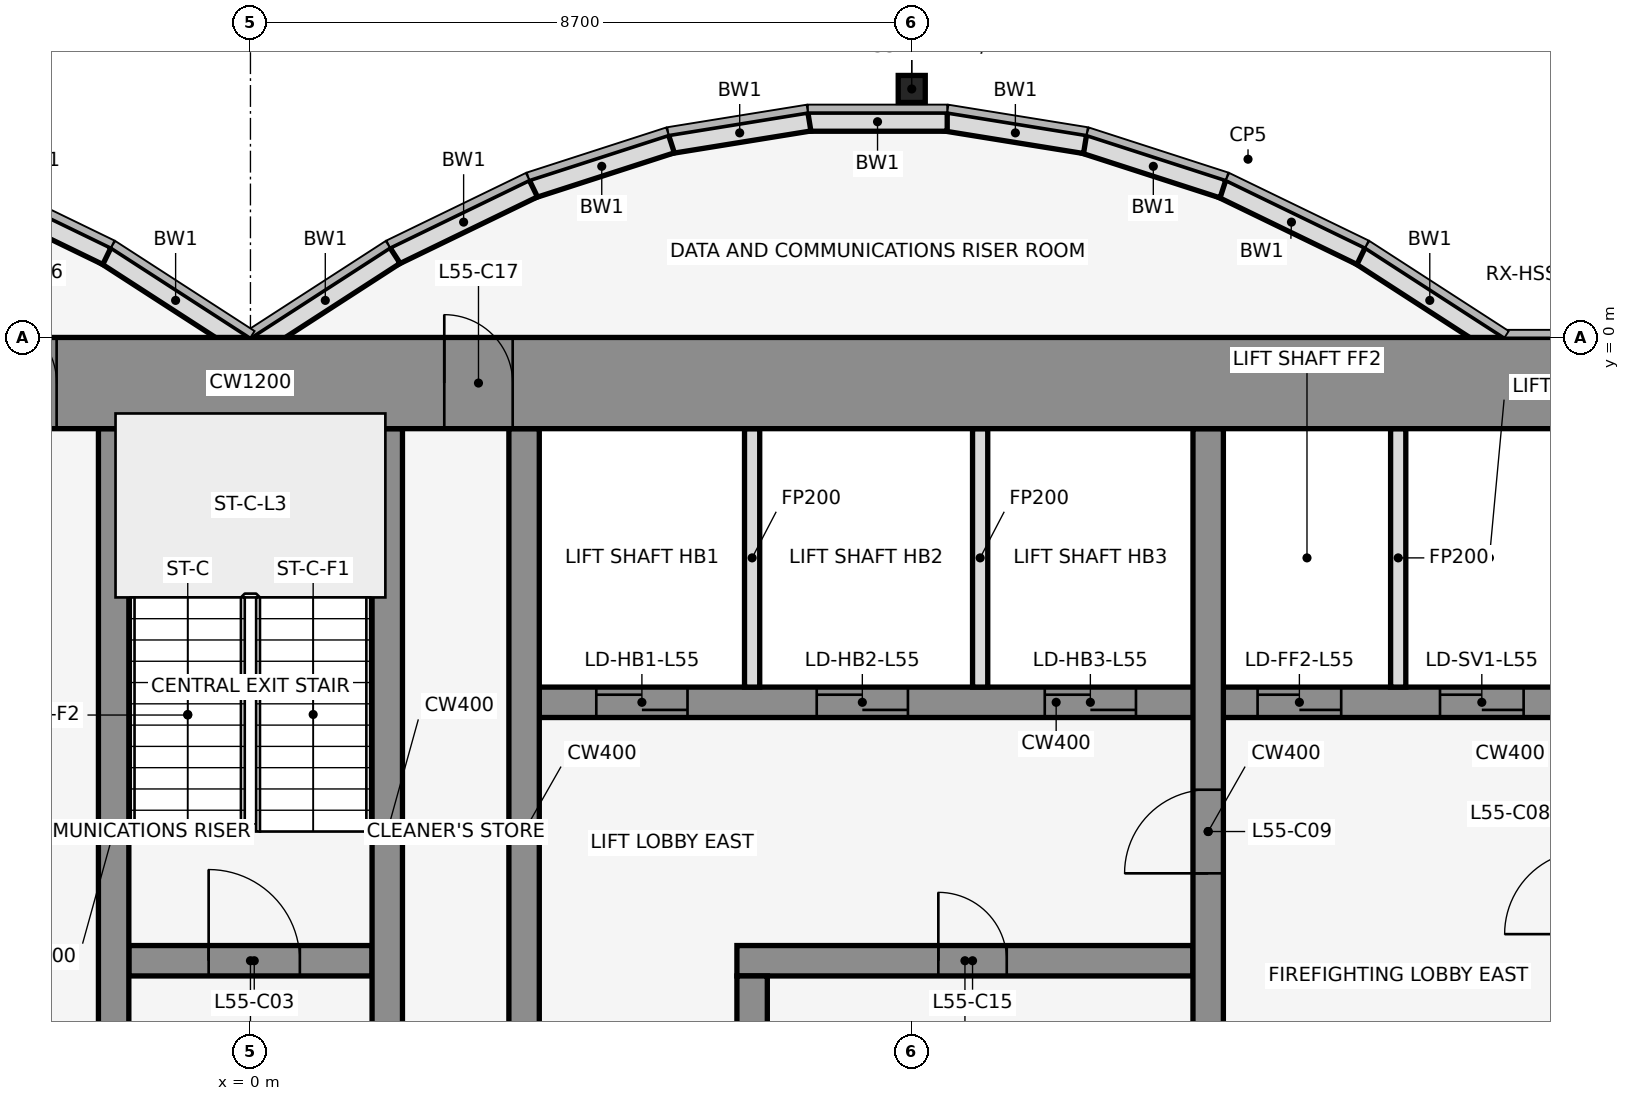
"""IFC4 building model, lengths in metres.
Left out: names, types, materials, properties, quantities, classifications, styles, units other than length and angle.
Written with IfcOpenShell. Run it as: python <this file> out.ifc"""

import sys

from ifc_helpers import new_model, si_unit, direction, frame, frame_2d, origin, origin_2d, place, context, subcontext, project, spatial, rectangle, hollow_rectangle, extrude, element, fill, save


model = new_model("IFC4")
c1 = context("Model", 3, precision=1e-05, world=origin(), true_north=direction((0.0, 1.0)))
c2 = subcontext(c1, "Body", "Model", "MODEL_VIEW")
j1 = project(units=[si_unit("LENGTHUNIT", "METRE"), si_unit("PLANEANGLEUNIT", "RADIAN")], contexts=[c1])
p1 = place(None, origin())
s1 = spatial("IfcSite", under=j1, at=p1, CompositionType="ELEMENT")
p2 = place(p1, origin())
s2 = spatial("IfcBuilding", under=s1, at=p2, CompositionType="ELEMENT")
p3 = place(p2, frame((0.0, 0.0, 245.6)))
s3 = spatial("IfcBuildingStorey", under=s2, at=p3, CompositionType="ELEMENT", Elevation=245.6)
p4 = place(p3, frame((8.7, 3.269, 0.0), z_axis=(0.0, 0.0, 1.0), x_axis=(1.0, 0.0, 0.0)))
e1 = element("IfcColumn", 1, at=p4, inside=s3, PredefinedType="COLUMN", context=c2, shape_type="SweptSolid", body=[
    extrude(hollow_rectangle(XDim=0.356, YDim=0.356, WallThickness=0.012, at=origin_2d()), origin(), (0.0, 0.0, 1.0), 4.2),
])
p5 = place(p3, frame((16.432, -0.105, 0.0), z_axis=(0.0, 0.0, 1.0), x_axis=(-0.83981312244, 0.542875602121, 0.0)))
e2 = element("IfcWall", 2, at=p5, inside=s3, PredefinedType="STANDARD", context=c2, shape_type="SweptSolid", body=[
    extrude(rectangle(XDim=2.183, YDim=0.25, at=frame_2d((1.091, 0.0))), origin(), (0.0, 0.0, 1.0), 4.05),
])
p6 = place(p3, frame((14.612, 1.073, 0.0), z_axis=(0.0, 0.0, 1.0), x_axis=(-0.89982408427, 0.436252928206, 0.0)))
e3 = element("IfcWall", 3, at=p6, inside=s3, PredefinedType="STANDARD", context=c2, shape_type="SweptSolid", body=[
    extrude(rectangle(XDim=2.038, YDim=0.25, at=frame_2d((1.019, 0.0))), origin(), (0.0, 0.0, 1.0), 4.05),
])
p7 = place(p3, frame((12.795, 1.955, 0.0), z_axis=(0.0, 0.0, 1.0), x_axis=(-0.951495806175, 0.307661714928, 0.0)))
e4 = element("IfcWall", 4, at=p7, inside=s3, PredefinedType="STANDARD", context=c2, shape_type="SweptSolid", body=[
    extrude(rectangle(XDim=1.927, YDim=0.25, at=frame_2d((0.963, 0.0))), origin(), (0.0, 0.0, 1.0), 4.05),
])
p8 = place(p3, frame((10.98, 2.543, 0.0), z_axis=(0.0, 0.0, 1.0), x_axis=(-0.987181718931, 0.159600293885, 0.0)))
e5 = element("IfcWall", 5, at=p8, inside=s3, PredefinedType="STANDARD", context=c2, shape_type="SweptSolid", body=[
    extrude(rectangle(XDim=1.857, YDim=0.25, at=frame_2d((0.929, 0.0))), origin(), (0.0, 0.0, 1.0), 4.05),
])
p9 = place(p3, frame((9.167, 2.838, 0.0), z_axis=(0.0, 0.0, 1.0), x_axis=(-1.0, 0.0, 0.0)))
e6 = element("IfcWall", 6, at=p9, inside=s3, PredefinedType="STANDARD", context=c2, shape_type="SweptSolid", body=[
    extrude(rectangle(XDim=1.833, YDim=0.25, at=frame_2d((0.917, 0.0))), origin(), (0.0, 0.0, 1.0), 4.05),
])
p10 = place(p3, frame((7.353, 2.84, 0.0), z_axis=(0.0, 0.0, 1.0), x_axis=(-0.987181718931, -0.159600293885, 0.0)))
e7 = element("IfcWall", 7, at=p10, inside=s3, PredefinedType="STANDARD", context=c2, shape_type="SweptSolid", body=[
    extrude(rectangle(XDim=1.857, YDim=0.25, at=frame_2d((0.929, 0.0))), origin(), (0.0, 0.0, 1.0), 4.05),
])
p11 = place(p3, frame((5.538, 2.548, 0.0), z_axis=(0.0, 0.0, 1.0), x_axis=(-0.951495806175, -0.307661714928, 0.0)))
e8 = element("IfcWall", 8, at=p11, inside=s3, PredefinedType="STANDARD", context=c2, shape_type="SweptSolid", body=[
    extrude(rectangle(XDim=1.927, YDim=0.25, at=frame_2d((0.963, 0.0))), origin(), (0.0, 0.0, 1.0), 4.05),
])
p12 = place(p3, frame((3.721, 1.962, 0.0), z_axis=(0.0, 0.0, 1.0), x_axis=(-0.89982408427, -0.436252928206, 0.0)))
e9 = element("IfcWall", 9, at=p12, inside=s3, PredefinedType="STANDARD", context=c2, shape_type="SweptSolid", body=[
    extrude(rectangle(XDim=2.038, YDim=0.25, at=frame_2d((1.019, 0.0))), origin(), (0.0, 0.0, 1.0), 4.05),
])
for number, where, z_axis, x_axis in (
    (10, (1.901, 1.08, 0.0), (0.0, 0.0, 1.0), (-0.84, -0.543, 0.0)),
    (11, (-0.068, -0.105, 0.0), (0.0, 0.0, 1.0), (-0.84, 0.543, 0.0)),
):
    element("IfcWall", number, at=place(p3, frame(where, z_axis=z_axis, x_axis=x_axis)), inside=s3, PredefinedType="STANDARD", context=c2, shape_type="SweptSolid", body=[
        extrude(rectangle(XDim=2.183, YDim=0.25, at=frame_2d((1.091, 0.0))), origin(), (0.0, 0.0, 1.0), 4.05),
    ])
p13 = place(p3, frame((-1.888, 1.073, 0.0), z_axis=(0.0, 0.0, 1.0), x_axis=(-0.89982408427, 0.436252928206, 0.0)))
e12 = element("IfcWall", 12, at=p13, inside=s3, PredefinedType="STANDARD", context=c2, shape_type="SweptSolid", body=[
    extrude(rectangle(XDim=2.038, YDim=0.25, at=frame_2d((1.019, 0.0))), origin(), (0.0, 0.0, 1.0), 4.05),
])
p14 = place(p3, frame((-1.6, -8.2, 0.0), z_axis=(0.0, 0.0, 1.0), x_axis=(1.0, 0.0, 0.0)))
e13 = element("IfcWall", 13, at=p14, inside=s3, PredefinedType="SHEAR", context=c2, shape_type="SweptSolid", body=[
    extrude(rectangle(XDim=3.2, YDim=0.4, at=frame_2d((1.6, 0.0))), origin(), (0.0, 0.0, 1.0), 4.2),
])
p15 = place(p14, frame((1.05, 0.0, 0.0)))
e14 = element("IfcOpeningElement", 14, at=p15, cuts=e13, PredefinedType="OPENING", context=c2, shape_type="SweptSolid", body=[
    extrude(rectangle(XDim=1.2, YDim=2.1, at=frame_2d((0.6, 1.05))), frame((0.0, 0.212, 0.0), z_axis=(0.0, -1.0, 0.0), x_axis=(1.0, 0.0, 0.0)), (0.0, 0.0, 1.0), 0.424),
])
p16 = place(p3, frame((6.4, -8.2, 0.0), z_axis=(0.0, 0.0, 1.0), x_axis=(1.0, 0.0, 0.0)))
e15 = element("IfcWall", 15, at=p16, inside=s3, PredefinedType="SHEAR", context=c2, shape_type="SweptSolid", body=[
    extrude(rectangle(XDim=6.0, YDim=0.4, at=frame_2d((3.0, 0.0))), origin(), (0.0, 0.0, 1.0), 4.2),
])
p17 = place(p16, frame((2.65, 0.0, 0.0)))
e16 = element("IfcOpeningElement", 16, at=p17, cuts=e15, PredefinedType="OPENING", context=c2, shape_type="SweptSolid", body=[
    extrude(rectangle(XDim=0.9, YDim=2.1, at=frame_2d((0.45, 1.05))), frame((0.0, 0.212, 0.0), z_axis=(0.0, -1.0, 0.0), x_axis=(1.0, 0.0, 0.0)), (0.0, 0.0, 1.0), 0.424),
])
p18 = place(p3, frame((3.8, -4.8, 0.0), z_axis=(0.0, 0.0, 1.0), x_axis=(1.0, 0.0, 0.0)))
e17 = element("IfcWall", 17, at=p18, inside=s3, PredefinedType="SHEAR", context=c2, shape_type="SweptSolid", body=[
    extrude(rectangle(XDim=13.6, YDim=0.4, at=frame_2d((6.8, 0.0))), origin(), (0.0, 0.0, 1.0), 4.2),
])
p19 = place(p18, frame((0.75, 0.0, 0.0)))
e18 = element("IfcOpeningElement", 18, at=p19, cuts=e17, PredefinedType="OPENING", context=c2, shape_type="SweptSolid", body=[
    extrude(rectangle(XDim=1.2, YDim=2.1, at=frame_2d((0.6, 1.05))), frame((0.0, 0.212, 0.0), z_axis=(0.0, -1.0, 0.0), x_axis=(1.0, 0.0, 0.0)), (0.0, 0.0, 1.0), 0.424),
])
p20 = place(p18, frame((3.65, 0.0, 0.0)))
e19 = element("IfcOpeningElement", 19, at=p20, cuts=e17, PredefinedType="OPENING", context=c2, shape_type="SweptSolid", body=[
    extrude(rectangle(XDim=1.2, YDim=2.1, at=frame_2d((0.6, 1.05))), frame((0.0, 0.212, 0.0), z_axis=(0.0, -1.0, 0.0), x_axis=(1.0, 0.0, 0.0)), (0.0, 0.0, 1.0), 0.424),
])
p21 = place(p18, frame((6.65, 0.0, 0.0)))
e20 = element("IfcOpeningElement", 20, at=p21, cuts=e17, PredefinedType="OPENING", context=c2, shape_type="SweptSolid", body=[
    extrude(rectangle(XDim=1.2, YDim=2.1, at=frame_2d((0.6, 1.05))), frame((0.0, 0.212, 0.0), z_axis=(0.0, -1.0, 0.0), x_axis=(1.0, 0.0, 0.0)), (0.0, 0.0, 1.0), 0.424),
])
p22 = place(p18, frame((9.45, 0.0, 0.0)))
e21 = element("IfcOpeningElement", 21, at=p22, cuts=e17, PredefinedType="OPENING", context=c2, shape_type="SweptSolid", body=[
    extrude(rectangle(XDim=1.1, YDim=2.1, at=frame_2d((0.55, 1.05))), frame((0.0, 0.212, 0.0), z_axis=(0.0, -1.0, 0.0), x_axis=(1.0, 0.0, 0.0)), (0.0, 0.0, 1.0), 0.424),
])
p23 = place(p18, frame((11.85, 0.0, 0.0)))
e22 = element("IfcOpeningElement", 22, at=p23, cuts=e17, PredefinedType="OPENING", context=c2, shape_type="SweptSolid", body=[
    extrude(rectangle(XDim=1.1, YDim=2.1, at=frame_2d((0.55, 1.05))), frame((0.0, 0.212, 0.0), z_axis=(0.0, -1.0, 0.0), x_axis=(1.0, 0.0, 0.0)), (0.0, 0.0, 1.0), 0.424),
])
for number, where, z_axis, x_axis in (
    (23, (-1.8, -11.8, 0.0), (0.0, 0.0, 1.0), (0.0, 1.0, 0.0)),
    (24, (1.8, -11.8, 0.0), (0.0, 0.0, 1.0), (0.0, 1.0, 0.0)),
):
    element("IfcWall", number, at=place(p3, frame(where, z_axis=z_axis, x_axis=x_axis)), inside=s3, PredefinedType="SHEAR", context=c2, shape_type="SweptSolid", body=[
        extrude(rectangle(XDim=10.6, YDim=0.4, at=frame_2d((5.3, 0.0))), origin(), (0.0, 0.0, 1.0), 4.2),
    ])
p24 = place(p3, frame((3.6, -11.8, 0.0), z_axis=(0.0, 0.0, 1.0), x_axis=(0.0, 1.0, 0.0)))
e25 = element("IfcWall", 25, at=p24, inside=s3, PredefinedType="SHEAR", context=c2, shape_type="SweptSolid", body=[
    extrude(rectangle(XDim=10.6, YDim=0.4, at=frame_2d((5.3, 0.0))), origin(), (0.0, 0.0, 1.0), 4.2),
])
p25 = place(p24, frame((1.35, 0.0, 0.0)))
e26 = element("IfcOpeningElement", 26, at=p25, cuts=e25, PredefinedType="OPENING", context=c2, shape_type="SweptSolid", body=[
    extrude(rectangle(XDim=0.9, YDim=2.1, at=frame_2d((0.45, 1.05))), frame((0.0, 0.212, 0.0), z_axis=(0.0, -1.0, 0.0), x_axis=(1.0, 0.0, 0.0)), (0.0, 0.0, 1.0), 0.424),
])
p26 = place(p3, frame((6.6, -11.8, 0.0), z_axis=(0.0, 0.0, 1.0), x_axis=(0.0, 1.0, 0.0)))
e27 = element("IfcWall", 27, at=p26, inside=s3, PredefinedType="SHEAR", context=c2, shape_type="SweptSolid", body=[
    extrude(rectangle(XDim=3.4, YDim=0.4, at=frame_2d((1.7, 0.0))), origin(), (0.0, 0.0, 1.0), 4.2),
])
for number, where, z_axis, x_axis in (
    (28, (6.6, -4.6, 0.0), (0.0, 0.0, 1.0), (0.0, 1.0, 0.0)),
    (29, (9.6, -4.6, 0.0), (0.0, 0.0, 1.0), (0.0, 1.0, 0.0)),
):
    element("IfcWall", number, at=place(p3, frame(where, z_axis=z_axis, x_axis=x_axis)), inside=s3, PredefinedType="PARTITIONING", context=c2, shape_type="SweptSolid", body=[
        extrude(rectangle(XDim=3.4, YDim=0.2, at=frame_2d((1.7, 0.0))), origin(), (0.0, 0.0, 1.0), 3.039),
    ])
p27 = place(p3, frame((12.6, -11.8, 0.0), z_axis=(0.0, 0.0, 1.0), x_axis=(0.0, 1.0, 0.0)))
e30 = element("IfcWall", 30, at=p27, inside=s3, PredefinedType="SHEAR", context=c2, shape_type="SweptSolid", body=[
    extrude(rectangle(XDim=10.6, YDim=0.4, at=frame_2d((5.3, 0.0))), origin(), (0.0, 0.0, 1.0), 4.2),
])
p28 = place(p27, frame((4.75, 0.0, 0.0)))
e31 = element("IfcOpeningElement", 31, at=p28, cuts=e30, PredefinedType="OPENING", context=c2, shape_type="SweptSolid", body=[
    extrude(rectangle(XDim=1.1, YDim=2.1, at=frame_2d((0.55, 1.05))), frame((0.0, 0.212, 0.0), z_axis=(0.0, -1.0, 0.0), x_axis=(1.0, 0.0, 0.0)), (0.0, 0.0, 1.0), 0.424),
])
p29 = place(p3, frame((15.1, -4.6, 0.0), z_axis=(0.0, 0.0, 1.0), x_axis=(0.0, 1.0, 0.0)))
e32 = element("IfcWall", 32, at=p29, inside=s3, PredefinedType="PARTITIONING", context=c2, shape_type="SweptSolid", body=[
    extrude(rectangle(XDim=3.4, YDim=0.2, at=frame_2d((1.7, 0.0))), origin(), (0.0, 0.0, 1.0), 3.039),
])
p30 = place(p3, frame((-22.0, -0.6, 0.0), z_axis=(0.0, 0.0, 1.0), x_axis=(1.0, 0.0, 0.0)))
e33 = element("IfcWall", 33, at=p30, inside=s3, PredefinedType="SHEAR", context=c2, shape_type="SweptSolid", body=[
    extrude(rectangle(XDim=44.0, YDim=1.2, at=frame_2d((22.0, 0.0))), origin(), (0.0, 0.0, 1.0), 4.2),
])
p31 = place(p30, frame((18.55, 0.0, 0.0)))
e34 = element("IfcOpeningElement", 34, at=p31, cuts=e33, PredefinedType="OPENING", context=c2, shape_type="SweptSolid", body=[
    extrude(rectangle(XDim=0.9, YDim=2.1, at=frame_2d((0.45, 1.05))), frame((0.0, 0.612, 0.0), z_axis=(0.0, -1.0, 0.0), x_axis=(1.0, 0.0, 0.0)), (0.0, 0.0, 1.0), 1.224),
])
p32 = place(p30, frame((24.55, 0.0, 0.0)))
e35 = element("IfcOpeningElement", 35, at=p32, cuts=e33, PredefinedType="OPENING", context=c2, shape_type="SweptSolid", body=[
    extrude(rectangle(XDim=0.9, YDim=2.1, at=frame_2d((0.45, 1.05))), frame((0.0, 0.612, 0.0), z_axis=(0.0, -1.0, 0.0), x_axis=(1.0, 0.0, 0.0)), (0.0, 0.0, 1.0), 1.224),
])
p33 = place(p15, origin())
e36 = element("IfcDoor", 36, at=p33, inside=s3, OperationType="SINGLE_SWING_LEFT", PredefinedType="DOOR", context=c2, shape_type="SweptSolid", body=[
    extrude(rectangle(XDim=1.2, YDim=2.1, at=frame_2d((0.6, 1.05))), frame((0.0, 0.025, 0.0), z_axis=(0.0, -1.0, 0.0), x_axis=(1.0, 0.0, 0.0)), (0.0, 0.0, 1.0), 0.05),
])
fill(e14, e36)
p34 = place(p19, origin())
e37 = element("IfcDoor", 37, at=p34, inside=s3, OperationType="DOUBLE_DOOR_SLIDING", PredefinedType="DOOR", context=c2, shape_type="SweptSolid", body=[
    extrude(rectangle(XDim=1.2, YDim=2.1, at=frame_2d((0.6, 1.05))), frame((0.0, 0.025, 0.0), z_axis=(0.0, -1.0, 0.0), x_axis=(1.0, 0.0, 0.0)), (0.0, 0.0, 1.0), 0.05),
])
fill(e18, e37)
p35 = place(p20, origin())
e38 = element("IfcDoor", 38, at=p35, inside=s3, OperationType="DOUBLE_DOOR_SLIDING", PredefinedType="DOOR", context=c2, shape_type="SweptSolid", body=[
    extrude(rectangle(XDim=1.2, YDim=2.1, at=frame_2d((0.6, 1.05))), frame((0.0, 0.025, 0.0), z_axis=(0.0, -1.0, 0.0), x_axis=(1.0, 0.0, 0.0)), (0.0, 0.0, 1.0), 0.05),
])
fill(e19, e38)
p36 = place(p21, origin())
e39 = element("IfcDoor", 39, at=p36, inside=s3, OperationType="DOUBLE_DOOR_SLIDING", PredefinedType="DOOR", context=c2, shape_type="SweptSolid", body=[
    extrude(rectangle(XDim=1.2, YDim=2.1, at=frame_2d((0.6, 1.05))), frame((0.0, 0.025, 0.0), z_axis=(0.0, -1.0, 0.0), x_axis=(1.0, 0.0, 0.0)), (0.0, 0.0, 1.0), 0.05),
])
fill(e20, e39)
p37 = place(p22, origin())
e40 = element("IfcDoor", 40, at=p37, inside=s3, OperationType="DOUBLE_DOOR_SLIDING", PredefinedType="DOOR", context=c2, shape_type="SweptSolid", body=[
    extrude(rectangle(XDim=1.1, YDim=2.1, at=frame_2d((0.55, 1.05))), frame((0.0, 0.025, 0.0), z_axis=(0.0, -1.0, 0.0), x_axis=(1.0, 0.0, 0.0)), (0.0, 0.0, 1.0), 0.05),
])
fill(e21, e40)
p38 = place(p23, origin())
e41 = element("IfcDoor", 41, at=p38, inside=s3, OperationType="DOUBLE_DOOR_SLIDING", PredefinedType="DOOR", context=c2, shape_type="SweptSolid", body=[
    extrude(rectangle(XDim=1.1, YDim=2.1, at=frame_2d((0.55, 1.05))), frame((0.0, 0.025, 0.0), z_axis=(0.0, -1.0, 0.0), x_axis=(1.0, 0.0, 0.0)), (0.0, 0.0, 1.0), 0.05),
])
fill(e22, e41)
p39 = place(p28, frame((1.1, 0.0, 0.0), z_axis=(0.0, 0.0, 1.0), x_axis=(-1.0, 0.0, 0.0)))
e42 = element("IfcDoor", 42, at=p39, inside=s3, OperationType="SINGLE_SWING_RIGHT", PredefinedType="DOOR", context=c2, shape_type="SweptSolid", body=[
    extrude(rectangle(XDim=1.1, YDim=2.1, at=frame_2d((0.55, 1.05))), frame((0.0, 0.025, 0.0), z_axis=(0.0, -1.0, 0.0), x_axis=(1.0, 0.0, 0.0)), (0.0, 0.0, 1.0), 0.05),
])
fill(e31, e42)
p40 = place(p17, frame((0.9, 0.0, 0.0), z_axis=(0.0, 0.0, 1.0), x_axis=(-1.0, 0.0, 0.0)))
e43 = element("IfcDoor", 43, at=p40, inside=s3, OperationType="SINGLE_SWING_RIGHT", PredefinedType="DOOR", context=c2, shape_type="SweptSolid", body=[
    extrude(rectangle(XDim=0.9, YDim=2.1, at=frame_2d((0.45, 1.05))), frame((0.0, 0.025, 0.0), z_axis=(0.0, -1.0, 0.0), x_axis=(1.0, 0.0, 0.0)), (0.0, 0.0, 1.0), 0.05),
])
fill(e16, e43)
p41 = place(p31, origin())
e44 = element("IfcDoor", 44, at=p41, inside=s3, OperationType="SINGLE_SWING_LEFT", PredefinedType="DOOR", context=c2, shape_type="SweptSolid", body=[
    extrude(rectangle(XDim=0.9, YDim=2.1, at=frame_2d((0.45, 1.05))), frame((0.0, 0.025, 0.0), z_axis=(0.0, -1.0, 0.0), x_axis=(1.0, 0.0, 0.0)), (0.0, 0.0, 1.0), 0.05),
])
fill(e34, e44)
p42 = place(p32, origin())
e45 = element("IfcDoor", 45, at=p42, inside=s3, OperationType="SINGLE_SWING_LEFT", PredefinedType="DOOR", context=c2, shape_type="SweptSolid", body=[
    extrude(rectangle(XDim=0.9, YDim=2.1, at=frame_2d((0.45, 1.05))), frame((0.0, 0.025, 0.0), z_axis=(0.0, -1.0, 0.0), x_axis=(1.0, 0.0, 0.0)), (0.0, 0.0, 1.0), 0.05),
])
fill(e35, e45)
save(model, sys.argv[1])
